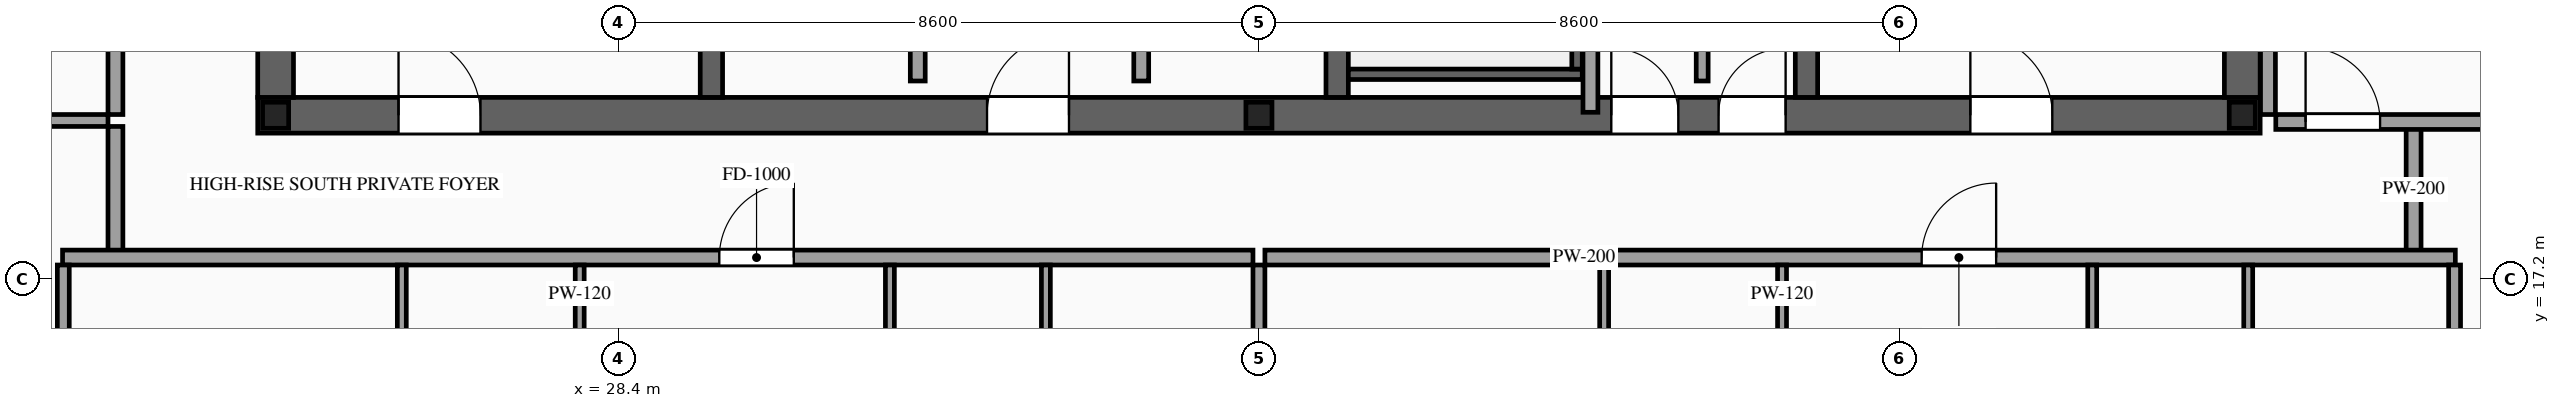
"""IFC4 building model, lengths in metres.
Left out: names, types, materials, properties, quantities, classifications, styles, units other than length and angle.
Written with IfcOpenShell. Run it as: python <this file> out.ifc"""

import sys

from ifc_helpers import new_model, si_unit, direction, frame, frame_2d, origin, origin_2d, place, context, subcontext, project, spatial, rectangle, i_section, extrude, source, transform, mapped, element, fill, save


model = new_model("IFC4")
c1 = context("Model", 3, precision=1e-05, world=origin(), true_north=direction((0.0, 1.0)))
c2 = subcontext(c1, "Body", "Model", "MODEL_VIEW")
j1 = project(units=[si_unit("LENGTHUNIT", "METRE"), si_unit("PLANEANGLEUNIT", "RADIAN")], contexts=[c1])
p1 = place(None, origin())
s1 = spatial("IfcSite", under=j1, at=p1, CompositionType="ELEMENT")
p2 = place(p1, origin())
s2 = spatial("IfcBuilding", under=s1, at=p2, CompositionType="ELEMENT")
p3 = place(p2, frame((0.0, 0.0, 328.7)))
s3 = spatial("IfcBuildingStorey", under=s2, at=p3, CompositionType="ELEMENT", Elevation=328.7)
p4 = place(p3, frame((23.56, 19.4, 0.0), z_axis=(0.0, 0.0, 1.0), x_axis=(1.0, 0.0, 0.0)))
e1 = element("IfcWall", 1, at=p4, inside=s3, PredefinedType="SHEAR", context=c2, shape_type="SweptSolid", body=[
    extrude(rectangle(XDim=26.88, YDim=0.48, at=frame_2d((13.44, 0.0))), origin(), (0.0, 0.0, 1.0), 3.5),
])
p5 = place(p4, frame((1.89, 0.0, 0.0)))
e2 = element("IfcOpeningElement", 2, at=p5, cuts=e1, PredefinedType="OPENING", context=c2, shape_type="SweptSolid", body=[
    extrude(rectangle(XDim=1.1, YDim=2.2, at=frame_2d((0.55, 1.1))), frame((0.0, 0.255, 0.0), z_axis=(0.0, -1.0, 0.0), x_axis=(1.0, 0.0, 0.0)), (0.0, 0.0, 1.0), 0.51),
])
p6 = place(p4, frame((9.79, 0.0, 0.0)))
e3 = element("IfcOpeningElement", 3, at=p6, cuts=e1, PredefinedType="OPENING", context=c2, shape_type="SweptSolid", body=[
    extrude(rectangle(XDim=1.1, YDim=2.2, at=frame_2d((0.55, 1.1))), frame((0.0, 0.255, 0.0), z_axis=(0.0, -1.0, 0.0), x_axis=(1.0, 0.0, 0.0)), (0.0, 0.0, 1.0), 0.51),
])
p7 = place(p4, frame((22.99, 0.0, 0.0)))
e4 = element("IfcOpeningElement", 4, at=p7, cuts=e1, PredefinedType="OPENING", context=c2, shape_type="SweptSolid", body=[
    extrude(rectangle(XDim=1.1, YDim=2.2, at=frame_2d((0.55, 1.1))), frame((0.0, 0.255, 0.0), z_axis=(0.0, -1.0, 0.0), x_axis=(1.0, 0.0, 0.0)), (0.0, 0.0, 1.0), 0.51),
])
p8 = place(p4, frame((19.61, 0.0, 0.0)))
e5 = element("IfcOpeningElement", 5, at=p8, cuts=e1, PredefinedType="OPENING", context=c2, shape_type="SweptSolid", body=[
    extrude(rectangle(XDim=0.9, YDim=2.15, at=frame_2d((0.45, 1.075))), frame((0.0, 0.255, 0.0), z_axis=(0.0, -1.0, 0.0), x_axis=(1.0, 0.0, 0.0)), (0.0, 0.0, 1.0), 0.51),
])
p9 = place(p4, frame((18.17, 0.0, 0.0)))
e6 = element("IfcOpeningElement", 6, at=p9, cuts=e1, PredefinedType="OPENING", context=c2, shape_type="SweptSolid", body=[
    extrude(rectangle(XDim=0.9, YDim=2.15, at=frame_2d((0.45, 1.075))), frame((0.0, 0.255, 0.0), z_axis=(0.0, -1.0, 0.0), x_axis=(1.0, 0.0, 0.0)), (0.0, 0.0, 1.0), 0.51),
])
m1 = source(origin(), c2, "Body", "SweptSolid", [
    extrude(rectangle(XDim=12.32, YDim=0.48, at=frame_2d((6.16, 0.0))), origin(), (0.0, 0.0, 1.0), 3.5),
])
for number, where, z_axis, x_axis in (
    (7, (23.8, 19.64, 0.0), (0.0, 0.0, 1.0), (0.0, 1.0, 0.0)),
    (8, (50.2, 19.64, 0.0), (0.0, 0.0, 1.0), (0.0, 1.0, 0.0)),
):
    element("IfcWall", number, at=place(p3, frame(where, z_axis=z_axis, x_axis=x_axis)), inside=s3, PredefinedType="SHEAR", context=c2, shape_type="MappedRepresentation", body=[
        mapped(m1, transform((0.0, 0.0, 0.0), scale=1.0)),
    ])
m2 = source(origin(), c2, "Body", "SweptSolid", [
    extrude(rectangle(XDim=12.32, YDim=0.3, at=frame_2d((6.16, 0.0))), origin(), (0.0, 0.0, 1.0), 3.5),
])
for number, where, z_axis, x_axis in (
    (9, (29.65, 19.64, 0.0), (0.0, 0.0, 1.0), (0.0, 1.0, 0.0)),
    (10, (38.05, 19.64, 0.0), (0.0, 0.0, 1.0), (0.0, 1.0, 0.0)),
):
    element("IfcWall", number, at=place(p3, frame(where, z_axis=z_axis, x_axis=x_axis)), inside=s3, PredefinedType="SOLIDWALL", context=c2, shape_type="MappedRepresentation", body=[
        mapped(m2, transform((0.0, 0.0, 0.0), scale=1.0)),
    ])
p10 = place(p3, frame((44.35, 19.64, 0.0), z_axis=(0.0, 0.0, 1.0), x_axis=(0.0, 1.0, 0.0)))
e11 = element("IfcWall", 11, at=p10, inside=s3, PredefinedType="SOLIDWALL", context=c2, shape_type="SweptSolid", body=[
    extrude(rectangle(XDim=12.32, YDim=0.3, at=frame_2d((6.16, 0.0))), origin(), (0.0, 0.0, 1.0), 3.5),
])
p11 = place(p10, frame((6.56, 0.0, 0.0)))
e12 = element("IfcOpeningElement", 12, at=p11, cuts=e11, PredefinedType="OPENING", context=c2, shape_type="SweptSolid", body=[
    extrude(rectangle(XDim=1.1, YDim=2.2, at=frame_2d((0.55, 1.1))), frame((0.0, 0.165, 0.0), z_axis=(0.0, -1.0, 0.0), x_axis=(1.0, 0.0, 0.0)), (0.0, 0.0, 1.0), 0.33),
])
p12 = place(p10, frame((8.66, 0.0, 0.0)))
e13 = element("IfcOpeningElement", 13, at=p12, cuts=e11, PredefinedType="OPENING", context=c2, shape_type="SweptSolid", body=[
    extrude(rectangle(XDim=1.1, YDim=2.2, at=frame_2d((0.55, 1.1))), frame((0.0, 0.165, 0.0), z_axis=(0.0, -1.0, 0.0), x_axis=(1.0, 0.0, 0.0)), (0.0, 0.0, 1.0), 0.33),
])
p13 = place(p10, frame((10.76, 0.0, 0.0)))
e14 = element("IfcOpeningElement", 14, at=p13, cuts=e11, PredefinedType="OPENING", context=c2, shape_type="SweptSolid", body=[
    extrude(rectangle(XDim=1.1, YDim=2.2, at=frame_2d((0.55, 1.1))), frame((0.0, 0.165, 0.0), z_axis=(0.0, -1.0, 0.0), x_axis=(1.0, 0.0, 0.0)), (0.0, 0.0, 1.0), 0.33),
])
m3 = source(origin(), c2, "Body", "SweptSolid", [
    extrude(i_section(OverallWidth=0.35, OverallDepth=0.35, WebThickness=0.012, FlangeThickness=0.019, at=origin_2d()), origin(), (0.0, 0.0, 1.0), 3.5),
])
for number, where, z_axis, x_axis in (
    (15, (23.8, 19.4, 0.0), (0.0, 0.0, 1.0), (1.0, 0.0, 0.0)),
    (16, (37.0, 19.4, 0.0), (0.0, 0.0, 1.0), (1.0, 0.0, 0.0)),
    (17, (50.2, 19.4, 0.0), (0.0, 0.0, 1.0), (1.0, 0.0, 0.0)),
):
    element("IfcColumn", number, at=place(p3, frame(where, z_axis=z_axis, x_axis=x_axis)), inside=s3, PredefinedType="COLUMN", context=c2, shape_type="MappedRepresentation", body=[
        mapped(m3, transform((0.0, 0.0, 0.0), scale=1.0)),
    ])
m4 = source(origin(), c2, "Body", "SweptSolid", [
    extrude(rectangle(XDim=3.14, YDim=0.14, at=frame_2d((1.57, 0.0))), origin(), (0.0, 0.0, 1.0), 3.28),
])
p14 = place(p3, frame((38.2, 19.95, 0.0), z_axis=(0.0, 0.0, 1.0), x_axis=(1.0, 0.0, 0.0)))
e18 = element("IfcWall", 18, at=p14, inside=s3, PredefinedType="SOLIDWALL", context=c2, shape_type="MappedRepresentation", body=[
    mapped(m4, transform((0.0, 0.0, 0.0), scale=1.0)),
])
m5 = source(origin(), c2, "Body", "SweptSolid", [
    extrude(rectangle(XDim=8.94, YDim=0.14, at=frame_2d((4.47, 0.0))), origin(), (0.0, 0.0, 1.0), 3.28),
])
p15 = place(p3, frame((41.27, 20.02, 0.0), z_axis=(0.0, 0.0, 1.0), x_axis=(0.0, 1.0, 0.0)))
e19 = element("IfcWall", 19, at=p15, inside=s3, PredefinedType="SOLIDWALL", context=c2, shape_type="MappedRepresentation", body=[
    mapped(m5, transform((0.0, 0.0, 0.0), scale=1.0)),
])
p16 = place(p3, frame((32.42, 19.86, 0.0), z_axis=(0.0, 0.0, 1.0), x_axis=(0.0, 1.0, 0.0)))
e20 = element("IfcWall", 20, at=p16, inside=s3, PredefinedType="PARTITIONING", context=c2, shape_type="SweptSolid", body=[
    extrude(rectangle(XDim=11.88, YDim=0.2, at=frame_2d((5.94, 0.0))), origin(), (0.0, 0.0, 1.0), 3.28),
])
p17 = place(p16, frame((5.49, 0.0, 0.0)))
e21 = element("IfcOpeningElement", 21, at=p17, cuts=e20, PredefinedType="OPENING", context=c2, shape_type="SweptSolid", body=[
    extrude(rectangle(XDim=0.9, YDim=2.15, at=frame_2d((0.45, 1.075))), frame((0.0, 0.115, 0.0), z_axis=(0.0, -1.0, 0.0), x_axis=(1.0, 0.0, 0.0)), (0.0, 0.0, 1.0), 0.23),
])
p18 = place(p3, frame((35.42, 19.86, 0.0), z_axis=(0.0, 0.0, 1.0), x_axis=(0.0, 1.0, 0.0)))
e22 = element("IfcWall", 22, at=p18, inside=s3, PredefinedType="PARTITIONING", context=c2, shape_type="SweptSolid", body=[
    extrude(rectangle(XDim=6.94, YDim=0.2, at=frame_2d((3.47, 0.0))), origin(), (0.0, 0.0, 1.0), 3.28),
])
p19 = place(p18, frame((3.02, 0.0, 0.0)))
e23 = element("IfcOpeningElement", 23, at=p19, cuts=e22, PredefinedType="OPENING", context=c2, shape_type="SweptSolid", body=[
    extrude(rectangle(XDim=0.9, YDim=2.15, at=frame_2d((0.45, 1.075))), frame((0.0, 0.115, 0.0), z_axis=(0.0, -1.0, 0.0), x_axis=(1.0, 0.0, 0.0)), (0.0, 0.0, 1.0), 0.23),
])
m6 = source(origin(), c2, "Body", "SweptSolid", [
    extrude(rectangle(XDim=1.34, YDim=0.16, at=frame_2d((0.67, 0.0))), origin(), (0.0, 0.0, 1.0), 3.28),
])
p20 = place(p3, frame((42.95, 19.86, 0.0), z_axis=(0.0, 0.0, 1.0), x_axis=(0.0, 1.0, 0.0)))
e24 = element("IfcWall", 24, at=p20, inside=s3, PredefinedType="PARTITIONING", context=c2, shape_type="MappedRepresentation", body=[
    mapped(m6, transform((0.0, 0.0, 0.0), scale=1.0)),
])
m7 = source(origin(), c2, "Body", "SweptSolid", [
    extrude(rectangle(XDim=6.06, YDim=0.2, at=frame_2d((3.03, 0.0))), origin(), (0.0, 0.0, 1.0), 3.28),
])
p21 = place(p3, frame((41.45, 19.44, 0.0), z_axis=(0.0, 0.0, 1.0), x_axis=(0.0, 1.0, 0.0)))
e25 = element("IfcWall", 25, at=p21, inside=s3, PredefinedType="PARTITIONING", context=c2, shape_type="MappedRepresentation", body=[
    mapped(m7, transform((0.0, 0.0, 0.0), scale=1.0)),
])
m8 = source(origin(), c2, "Body", "SweptSolid", [
    extrude(rectangle(XDim=1.7, YDim=0.2, at=frame_2d((0.85, 0.0))), origin(), (0.0, 0.0, 1.0), 3.28),
])
for number, where, z_axis, x_axis in (
    (26, (21.65, 17.55, 0.0), (0.0, 0.0, 1.0), (0.0, 1.0, 0.0)),
    (27, (52.5, 17.55, 0.0), (0.0, 0.0, 1.0), (0.0, 1.0, 0.0)),
):
    element("IfcWall", number, at=place(p3, frame(where, z_axis=z_axis, x_axis=x_axis)), inside=s3, PredefinedType="PARTITIONING", context=c2, shape_type="MappedRepresentation", body=[
        mapped(m8, transform((0.0, 0.0, 0.0), scale=1.0)),
    ])
p22 = place(p3, frame((20.94, 17.49, 0.0), z_axis=(0.0, 0.0, 1.0), x_axis=(1.0, 0.0, 0.0)))
e28 = element("IfcWall", 28, at=p22, inside=s3, PredefinedType="PARTITIONING", context=c2, shape_type="SweptSolid", body=[
    extrude(rectangle(XDim=15.98, YDim=0.2, at=frame_2d((7.99, 0.0))), origin(), (0.0, 0.0, 1.0), 3.28),
])
p23 = place(p22, frame((8.816, 0.0, 0.0)))
e29 = element("IfcOpeningElement", 29, at=p23, cuts=e28, PredefinedType="OPENING", context=c2, shape_type="SweptSolid", body=[
    extrude(rectangle(XDim=1.0, YDim=2.2, at=frame_2d((0.5, 1.1))), frame((0.0, 0.115, 0.0), z_axis=(0.0, -1.0, 0.0), x_axis=(1.0, 0.0, 0.0)), (0.0, 0.0, 1.0), 0.23),
])
m9 = source(origin(), c2, "Body", "SweptSolid", [
    extrude(rectangle(XDim=10.54, YDim=0.16, at=frame_2d((5.27, 0.0))), origin(), (0.0, 0.0, 1.0), 2.787),
])
p24 = place(p3, frame((37.0, 6.85, 0.0), z_axis=(0.0, 0.0, 1.0), x_axis=(0.0, 1.0, 0.0)))
e30 = element("IfcWall", 30, at=p24, inside=s3, PredefinedType="PARTITIONING", context=c2, shape_type="MappedRepresentation", body=[
    mapped(m9, transform((0.0, 0.0, 0.0), scale=1.0)),
])
m10 = source(origin(), c2, "Body", "SweptSolid", [
    extrude(rectangle(XDim=2.9, YDim=0.12, at=frame_2d((1.45, 0.0))), origin(), (0.0, 0.0, 1.0), 3.28),
])
p25 = place(p3, frame((25.494, 14.49, 0.0), z_axis=(0.0, 0.0, 1.0), x_axis=(0.0, 1.0, 0.0)))
e31 = element("IfcWall", 31, at=p25, inside=s3, PredefinedType="PARTITIONING", context=c2, shape_type="MappedRepresentation", body=[
    mapped(m10, transform((0.0, 0.0, 0.0), scale=1.0)),
])
p26 = place(p3, frame((27.882, 14.49, 0.0), z_axis=(0.0, 0.0, 1.0), x_axis=(0.0, 1.0, 0.0)))
e32 = element("IfcWall", 32, at=p26, inside=s3, PredefinedType="PARTITIONING", context=c2, shape_type="SweptSolid", body=[
    extrude(rectangle(XDim=2.9, YDim=0.12, at=frame_2d((1.45, 0.0))), origin(), (0.0, 0.0, 1.0), 3.28),
])
p27 = place(p26, frame((1.025, 0.0, 0.0)))
e33 = element("IfcOpeningElement", 33, at=p27, cuts=e32, PredefinedType="OPENING", context=c2, shape_type="SweptSolid", body=[
    extrude(rectangle(XDim=0.85, YDim=2.1, at=frame_2d((0.425, 1.05))), frame((0.0, 0.075, 0.0), z_axis=(0.0, -1.0, 0.0), x_axis=(1.0, 0.0, 0.0)), (0.0, 0.0, 1.0), 0.15),
])
for number, where, z_axis, x_axis in (
    (34, (34.14, 14.49, 0.0), (0.0, 0.0, 1.0), (0.0, 1.0, 0.0)),
    (35, (32.046, 14.49, 0.0), (0.0, 0.0, 1.0), (0.0, 1.0, 0.0)),
):
    element("IfcWall", number, at=place(p3, frame(where, z_axis=z_axis, x_axis=x_axis)), inside=s3, PredefinedType="PARTITIONING", context=c2, shape_type="MappedRepresentation", body=[
        mapped(m10, transform((0.0, 0.0, 0.0), scale=1.0)),
    ])
p28 = place(p3, frame((37.08, 17.49, 0.0), z_axis=(0.0, 0.0, 1.0), x_axis=(1.0, 0.0, 0.0)))
e36 = element("IfcWall", 36, at=p28, inside=s3, PredefinedType="PARTITIONING", context=c2, shape_type="SweptSolid", body=[
    extrude(rectangle(XDim=15.98, YDim=0.2, at=frame_2d((7.99, 0.0))), origin(), (0.0, 0.0, 1.0), 3.28),
])
p29 = place(p28, frame((8.816, 0.0, 0.0)))
e37 = element("IfcOpeningElement", 37, at=p29, cuts=e36, PredefinedType="OPENING", context=c2, shape_type="SweptSolid", body=[
    extrude(rectangle(XDim=1.0, YDim=2.2, at=frame_2d((0.5, 1.1))), frame((0.0, 0.115, 0.0), z_axis=(0.0, -1.0, 0.0), x_axis=(1.0, 0.0, 0.0)), (0.0, 0.0, 1.0), 0.23),
])
m11 = source(origin(), c2, "Body", "SweptSolid", [
    extrude(rectangle(XDim=10.39, YDim=0.16, at=frame_2d((5.195, 0.0))), origin(), (0.0, 0.0, 1.0), 3.28),
])
for number, where, z_axis, x_axis in (
    (38, (20.95, 7.0, 0.0), (0.0, 0.0, 1.0), (0.0, 1.0, 0.0)),
    (39, (53.05, 7.0, 0.0), (0.0, 0.0, 1.0), (0.0, 1.0, 0.0)),
):
    element("IfcWall", number, at=place(p3, frame(where, z_axis=z_axis, x_axis=x_axis)), inside=s3, PredefinedType="PARTITIONING", context=c2, shape_type="MappedRepresentation", body=[
        mapped(m11, transform((0.0, 0.0, 0.0), scale=1.0)),
    ])
p30 = place(p3, frame((41.634, 14.49, 0.0), z_axis=(0.0, 0.0, 1.0), x_axis=(0.0, 1.0, 0.0)))
e40 = element("IfcWall", 40, at=p30, inside=s3, PredefinedType="PARTITIONING", context=c2, shape_type="MappedRepresentation", body=[
    mapped(m10, transform((0.0, 0.0, 0.0), scale=1.0)),
])
p31 = place(p3, frame((44.022, 14.49, 0.0), z_axis=(0.0, 0.0, 1.0), x_axis=(0.0, 1.0, 0.0)))
e41 = element("IfcWall", 41, at=p31, inside=s3, PredefinedType="PARTITIONING", context=c2, shape_type="SweptSolid", body=[
    extrude(rectangle(XDim=2.9, YDim=0.12, at=frame_2d((1.45, 0.0))), origin(), (0.0, 0.0, 1.0), 3.28),
])
p32 = place(p31, frame((1.025, 0.0, 0.0)))
e42 = element("IfcOpeningElement", 42, at=p32, cuts=e41, PredefinedType="OPENING", context=c2, shape_type="SweptSolid", body=[
    extrude(rectangle(XDim=0.85, YDim=2.1, at=frame_2d((0.425, 1.05))), frame((0.0, 0.075, 0.0), z_axis=(0.0, -1.0, 0.0), x_axis=(1.0, 0.0, 0.0)), (0.0, 0.0, 1.0), 0.15),
])
m12 = source(origin(), c2, "Body", "SweptSolid", [
    extrude(rectangle(XDim=2.9, YDim=0.12, at=frame_2d((1.45, 0.0))), origin(), (0.0, 0.0, 1.0), 2.825),
])
p33 = place(p3, frame((50.28, 14.49, 0.0), z_axis=(0.0, 0.0, 1.0), x_axis=(0.0, 1.0, 0.0)))
e43 = element("IfcWall", 43, at=p33, inside=s3, PredefinedType="PARTITIONING", context=c2, shape_type="MappedRepresentation", body=[
    mapped(m12, transform((0.0, 0.0, 0.0), scale=1.0)),
])
p34 = place(p3, frame((48.186, 14.49, 0.0), z_axis=(0.0, 0.0, 1.0), x_axis=(0.0, 1.0, 0.0)))
e44 = element("IfcWall", 44, at=p34, inside=s3, PredefinedType="PARTITIONING", context=c2, shape_type="MappedRepresentation", body=[
    mapped(m10, transform((0.0, 0.0, 0.0), scale=1.0)),
])
p35 = place(p3, frame((21.65, 19.41, 0.0), z_axis=(0.0, 0.0, 1.0), x_axis=(0.0, 1.0, 0.0)))
e45 = element("IfcWall", 45, at=p35, inside=s3, PredefinedType="PARTITIONING", context=c2, shape_type="SweptSolid", body=[
    extrude(rectangle(XDim=12.78, YDim=0.2, at=frame_2d((6.39, 0.0))), origin(), (0.0, 0.0, 1.0), 3.28),
])
p36 = place(p35, frame((5.89, 0.0, 0.0)))
e46 = element("IfcOpeningElement", 46, at=p36, cuts=e45, PredefinedType="OPENING", context=c2, shape_type="SweptSolid", body=[
    extrude(rectangle(XDim=1.0, YDim=2.2, at=frame_2d((0.5, 1.1))), frame((0.0, 0.115, 0.0), z_axis=(0.0, -1.0, 0.0), x_axis=(1.0, 0.0, 0.0)), (0.0, 0.0, 1.0), 0.23),
])
m13 = source(origin(), c2, "Body", "SweptSolid", [
    extrude(rectangle(XDim=3.5, YDim=0.16, at=frame_2d((1.75, 0.0))), origin(), (0.0, 0.0, 1.0), 2.825),
])
p37 = place(p3, frame((18.05, 19.33, 0.0), z_axis=(0.0, 0.0, 1.0), x_axis=(1.0, 0.0, 0.0)))
e47 = element("IfcWall", 47, at=p37, inside=s3, PredefinedType="PARTITIONING", context=c2, shape_type="MappedRepresentation", body=[
    mapped(m13, transform((0.0, 0.0, 0.0), scale=1.0)),
])
p38 = place(p3, frame((50.65, 19.31, 0.0), z_axis=(0.0, 0.0, 1.0), x_axis=(1.0, 0.0, 0.0)))
e48 = element("IfcWall", 48, at=p38, inside=s3, PredefinedType="PARTITIONING", context=c2, shape_type="SweptSolid", body=[
    extrude(rectangle(XDim=5.3, YDim=0.2, at=frame_2d((2.65, 0.0))), origin(), (0.0, 0.0, 1.0), 2.825),
])
p39 = place(p38, frame((0.4, 0.0, 0.0)))
e49 = element("IfcOpeningElement", 49, at=p39, cuts=e48, PredefinedType="OPENING", context=c2, shape_type="SweptSolid", body=[
    extrude(rectangle(XDim=1.0, YDim=2.2, at=frame_2d((0.5, 1.1))), frame((0.0, 0.115, 0.0), z_axis=(0.0, -1.0, 0.0), x_axis=(1.0, 0.0, 0.0)), (0.0, 0.0, 1.0), 0.23),
])
m14 = source(origin(), c2, "Body", "SweptSolid", [
    extrude(rectangle(XDim=12.78, YDim=0.2, at=frame_2d((6.39, 0.0))), origin(), (0.0, 0.0, 1.0), 3.28),
])
p40 = place(p3, frame((50.545, 19.41, 0.0), z_axis=(0.0, 0.0, 1.0), x_axis=(0.0, 1.0, 0.0)))
e50 = element("IfcWall", 50, at=p40, inside=s3, PredefinedType="PARTITIONING", context=c2, shape_type="MappedRepresentation", body=[
    mapped(m14, transform((0.0, 0.0, 0.0), scale=1.0)),
])
m15 = source(origin(), c2, "Body", "SweptSolid", [
    extrude(rectangle(XDim=1.1, YDim=2.2, at=frame_2d((0.55, 1.1))), frame((0.0, 0.025, 0.0), z_axis=(0.0, -1.0, 0.0), x_axis=(1.0, 0.0, 0.0)), (0.0, 0.0, 1.0), 0.05),
])
p41 = place(p5, origin())
e51 = element("IfcDoor", 51, at=p41, inside=s3, OperationType="SINGLE_SWING_LEFT", PredefinedType="DOOR", context=c2, shape_type="MappedRepresentation", body=[
    mapped(m15, transform((0.0, 0.0, 0.0), scale=1.0)),
])
fill(e2, e51)
p42 = place(p6, origin())
e52 = element("IfcDoor", 52, at=p42, inside=s3, OperationType="SINGLE_SWING_RIGHT", PredefinedType="DOOR", context=c2, shape_type="MappedRepresentation", body=[
    mapped(m15, transform((0.0, 0.0, 0.0), scale=1.0)),
])
fill(e3, e52)
p43 = place(p7, origin())
e53 = element("IfcDoor", 53, at=p43, inside=s3, OperationType="SINGLE_SWING_LEFT", PredefinedType="DOOR", context=c2, shape_type="MappedRepresentation", body=[
    mapped(m15, transform((0.0, 0.0, 0.0), scale=1.0)),
])
fill(e4, e53)
m16 = source(origin(), c2, "Body", "SweptSolid", [
    extrude(rectangle(XDim=0.9, YDim=2.15, at=frame_2d((0.45, 1.075))), frame((0.0, 0.025, 0.0), z_axis=(0.0, -1.0, 0.0), x_axis=(1.0, 0.0, 0.0)), (0.0, 0.0, 1.0), 0.05),
])
p44 = place(p8, origin())
e54 = element("IfcDoor", 54, at=p44, inside=s3, OperationType="SINGLE_SWING_RIGHT", PredefinedType="DOOR", context=c2, shape_type="MappedRepresentation", body=[
    mapped(m16, transform((0.0, 0.0, 0.0), scale=1.0)),
])
fill(e5, e54)
p45 = place(p9, origin())
e55 = element("IfcDoor", 55, at=p45, inside=s3, OperationType="SINGLE_SWING_LEFT", PredefinedType="DOOR", context=c2, shape_type="MappedRepresentation", body=[
    mapped(m16, transform((0.0, 0.0, 0.0), scale=1.0)),
])
fill(e6, e55)
m17 = source(origin(), c2, "Body", "SweptSolid", [
    extrude(rectangle(XDim=1.0, YDim=2.2, at=frame_2d((0.5, 1.1))), frame((0.0, 0.025, 0.0), z_axis=(0.0, -1.0, 0.0), x_axis=(1.0, 0.0, 0.0)), (0.0, 0.0, 1.0), 0.05),
])
p46 = place(p23, origin())
e56 = element("IfcDoor", 56, at=p46, inside=s3, OperationType="SINGLE_SWING_RIGHT", PredefinedType="DOOR", context=c2, shape_type="MappedRepresentation", body=[
    mapped(m17, transform((0.0, 0.0, 0.0), scale=1.0)),
])
fill(e29, e56)
p47 = place(p29, origin())
e57 = element("IfcDoor", 57, at=p47, inside=s3, OperationType="SINGLE_SWING_RIGHT", PredefinedType="DOOR", context=c2, shape_type="MappedRepresentation", body=[
    mapped(m17, transform((0.0, 0.0, 0.0), scale=1.0)),
])
fill(e37, e57)
p48 = place(p39, origin())
e58 = element("IfcDoor", 58, at=p48, inside=s3, OperationType="SINGLE_SWING_LEFT", PredefinedType="DOOR", context=c2, shape_type="MappedRepresentation", body=[
    mapped(m17, transform((0.0, 0.0, 0.0), scale=1.0)),
])
fill(e49, e58)
save(model, sys.argv[1])
